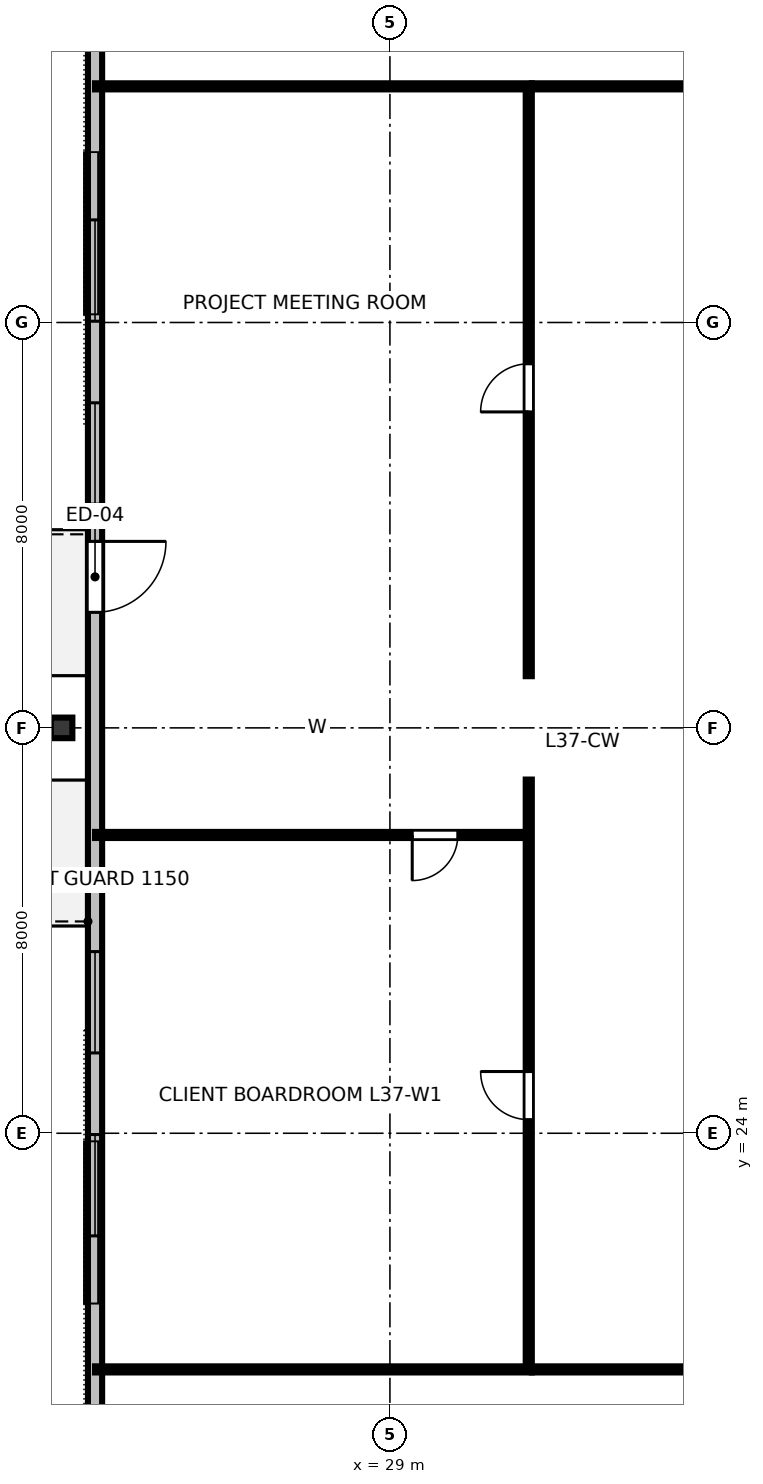
"""IFC4 building model, lengths in metres.
Left out: names, types, materials, properties, quantities, classifications, styles, units other than length and angle.
Written with IfcOpenShell. Run it as: python <this file> out.ifc"""

import sys

from ifc_helpers import new_model, si_unit, direction, frame, frame_2d, origin, origin_2d, place, context, subcontext, project, spatial, rectangle, i_section, extrude, element, fill, save


model = new_model("IFC4")
c1 = context("Model", 3, precision=1e-05, world=origin(), true_north=direction((0.0, 1.0)))
c2 = subcontext(c1, "Body", "Model", "MODEL_VIEW")
j1 = project(units=[si_unit("LENGTHUNIT", "METRE"), si_unit("PLANEANGLEUNIT", "RADIAN")], contexts=[c1])
p1 = place(None, origin())
s1 = spatial("IfcSite", under=j1, at=p1, CompositionType="ELEMENT")
p2 = place(p1, origin())
s2 = spatial("IfcBuilding", under=s1, at=p2, CompositionType="ELEMENT")
p3 = place(p2, frame((0.0, 0.0, 142.0)))
s3 = spatial("IfcBuildingStorey", under=s2, at=p3, CompositionType="ELEMENT", Elevation=142.0)
p4 = place(p3, frame((22.52, 32.0, 0.0), z_axis=(0.0, 0.0, 1.0), x_axis=(0.0, 1.0, 0.0)))
e1 = element("IfcColumn", 1, at=p4, inside=s3, PredefinedType="COLUMN", context=c2, shape_type="SweptSolid", body=[
    extrude(i_section(OverallWidth=0.406, OverallDepth=0.425, WebThickness=0.033, FlangeThickness=0.052, FilletRadius=0.025, at=origin_2d()), origin(), (0.0, 0.0, 1.0), 3.358),
])
p5 = place(p3, frame((23.18, 47.54, 0.0), z_axis=(0.0, 0.0, 1.0), x_axis=(0.0, -1.0, 0.0)))
e2 = element("IfcWall", 2, at=p5, inside=s3, PredefinedType="STANDARD", context=c2, shape_type="SweptSolid", body=[
    extrude(rectangle(XDim=31.08, YDim=0.28, at=frame_2d((15.54, 0.0))), origin(), (0.0, 0.0, 1.0), 3.36),
])
p6 = place(p5, frame((11.86, 0.0, 0.0)))
e3 = element("IfcOpeningElement", 3, at=p6, cuts=e2, PredefinedType="OPENING", context=c2, shape_type="SweptSolid", body=[
    extrude(rectangle(XDim=1.4, YDim=2.15, at=frame_2d((0.7, 1.075))), frame((0.0, 0.15, 0.0), z_axis=(0.0, -1.0, 0.0), x_axis=(1.0, 0.0, 0.0)), (0.0, 0.0, 1.0), 0.3),
])
p7 = place(p5, frame((5.515, 0.0, 0.8)))
e4 = element("IfcOpeningElement", 4, at=p7, cuts=e2, PredefinedType="OPENING", context=c2, shape_type="SweptSolid", body=[
    extrude(rectangle(XDim=2.0, YDim=1.95, at=frame_2d((1.0, 0.975))), frame((0.0, 0.15, 0.0), z_axis=(0.0, -1.0, 0.0), x_axis=(1.0, 0.0, 0.0)), (0.0, 0.0, 1.0), 0.3),
])
p8 = place(p5, frame((9.125, 0.0, 0.8)))
e5 = element("IfcOpeningElement", 5, at=p8, cuts=e2, PredefinedType="OPENING", context=c2, shape_type="SweptSolid", body=[
    extrude(rectangle(XDim=2.0, YDim=1.95, at=frame_2d((1.0, 0.975))), frame((0.0, 0.15, 0.0), z_axis=(0.0, -1.0, 0.0), x_axis=(1.0, 0.0, 0.0)), (0.0, 0.0, 1.0), 0.3),
])
p9 = place(p5, frame((19.955, 0.0, 0.8)))
e6 = element("IfcOpeningElement", 6, at=p9, cuts=e2, PredefinedType="OPENING", context=c2, shape_type="SweptSolid", body=[
    extrude(rectangle(XDim=2.0, YDim=1.95, at=frame_2d((1.0, 0.975))), frame((0.0, 0.15, 0.0), z_axis=(0.0, -1.0, 0.0), x_axis=(1.0, 0.0, 0.0)), (0.0, 0.0, 1.0), 0.3),
])
p10 = place(p5, frame((23.565, 0.0, 0.8)))
e7 = element("IfcOpeningElement", 7, at=p10, cuts=e2, PredefinedType="OPENING", context=c2, shape_type="SweptSolid", body=[
    extrude(rectangle(XDim=2.0, YDim=1.95, at=frame_2d((1.0, 0.975))), frame((0.0, 0.15, 0.0), z_axis=(0.0, -1.0, 0.0), x_axis=(1.0, 0.0, 0.0)), (0.0, 0.0, 1.0), 0.3),
])
p11 = place(p3, frame((31.8, 19.34, 0.0), z_axis=(0.0, 0.0, 1.0), x_axis=(1.0, 0.0, 0.0)))
e8 = element("IfcWall", 8, at=p11, inside=s3, PredefinedType="PARTITIONING", context=c2, shape_type="SweptSolid", body=[
    extrude(rectangle(XDim=28.4, YDim=0.12, at=frame_2d((14.2, 0.0))), origin(), (0.0, 0.0, 1.0), 2.64),
])
p12 = place(p11, frame((3.771, 0.0, 0.0)))
e9 = element("IfcOpeningElement", 9, at=p12, cuts=e8, PredefinedType="OPENING", context=c2, shape_type="SweptSolid", body=[
    extrude(rectangle(XDim=0.95, YDim=2.15, at=frame_2d((0.475, 1.075))), frame((0.0, 0.07, 0.0), z_axis=(0.0, -1.0, 0.0), x_axis=(1.0, 0.0, 0.0)), (0.0, 0.0, 1.0), 0.14),
])
p13 = place(p11, frame((10.068, 0.0, 0.0)))
e10 = element("IfcOpeningElement", 10, at=p13, cuts=e8, PredefinedType="OPENING", context=c2, shape_type="SweptSolid", body=[
    extrude(rectangle(XDim=0.95, YDim=2.15, at=frame_2d((0.475, 1.075))), frame((0.0, 0.07, 0.0), z_axis=(0.0, -1.0, 0.0), x_axis=(1.0, 0.0, 0.0)), (0.0, 0.0, 1.0), 0.14),
])
p14 = place(p11, frame((13.828, 0.0, 0.0)))
e11 = element("IfcOpeningElement", 11, at=p14, cuts=e8, PredefinedType="OPENING", context=c2, shape_type="SweptSolid", body=[
    extrude(rectangle(XDim=0.95, YDim=2.15, at=frame_2d((0.475, 1.075))), frame((0.0, 0.07, 0.0), z_axis=(0.0, -1.0, 0.0), x_axis=(1.0, 0.0, 0.0)), (0.0, 0.0, 1.0), 0.14),
])
p15 = place(p11, frame((18.648, 0.0, 0.0)))
e12 = element("IfcOpeningElement", 12, at=p15, cuts=e8, PredefinedType="OPENING", context=c2, shape_type="SweptSolid", body=[
    extrude(rectangle(XDim=0.95, YDim=2.15, at=frame_2d((0.475, 1.075))), frame((0.0, 0.07, 0.0), z_axis=(0.0, -1.0, 0.0), x_axis=(1.0, 0.0, 0.0)), (0.0, 0.0, 1.0), 0.14),
])
p16 = place(p11, frame((24.842, 0.0, 0.0)))
e13 = element("IfcOpeningElement", 13, at=p16, cuts=e8, PredefinedType="OPENING", context=c2, shape_type="SweptSolid", body=[
    extrude(rectangle(XDim=0.95, YDim=2.15, at=frame_2d((0.475, 1.075))), frame((0.0, 0.07, 0.0), z_axis=(0.0, -1.0, 0.0), x_axis=(1.0, 0.0, 0.0)), (0.0, 0.0, 1.0), 0.14),
])
p17 = place(p3, frame((31.8, 44.66, 0.0), z_axis=(0.0, 0.0, 1.0), x_axis=(1.0, 0.0, 0.0)))
e14 = element("IfcWall", 14, at=p17, inside=s3, PredefinedType="PARTITIONING", context=c2, shape_type="SweptSolid", body=[
    extrude(rectangle(XDim=28.4, YDim=0.12, at=frame_2d((14.2, 0.0))), origin(), (0.0, 0.0, 1.0), 2.64),
])
p18 = place(p17, frame((3.705, 0.0, 0.0)))
e15 = element("IfcOpeningElement", 15, at=p18, cuts=e14, PredefinedType="OPENING", context=c2, shape_type="SweptSolid", body=[
    extrude(rectangle(XDim=0.95, YDim=2.15, at=frame_2d((0.475, 1.075))), frame((0.0, 0.07, 0.0), z_axis=(0.0, -1.0, 0.0), x_axis=(1.0, 0.0, 0.0)), (0.0, 0.0, 1.0), 0.14),
])
p19 = place(p17, frame((11.836, 0.0, 0.0)))
e16 = element("IfcOpeningElement", 16, at=p19, cuts=e14, PredefinedType="OPENING", context=c2, shape_type="SweptSolid", body=[
    extrude(rectangle(XDim=0.95, YDim=2.15, at=frame_2d((0.475, 1.075))), frame((0.0, 0.07, 0.0), z_axis=(0.0, -1.0, 0.0), x_axis=(1.0, 0.0, 0.0)), (0.0, 0.0, 1.0), 0.14),
])
p20 = place(p17, frame((21.856, 0.0, 0.0)))
e17 = element("IfcOpeningElement", 17, at=p20, cuts=e14, PredefinedType="OPENING", context=c2, shape_type="SweptSolid", body=[
    extrude(rectangle(XDim=0.95, YDim=2.15, at=frame_2d((0.475, 1.075))), frame((0.0, 0.07, 0.0), z_axis=(0.0, -1.0, 0.0), x_axis=(1.0, 0.0, 0.0)), (0.0, 0.0, 1.0), 0.14),
])
p21 = place(p3, frame((31.74, 29.887, 0.0), z_axis=(0.0, 0.0, 1.0), x_axis=(-1.0, 0.0, 0.0)))
e18 = element("IfcWall", 18, at=p21, inside=s3, PredefinedType="PARTITIONING", context=c2, shape_type="SweptSolid", body=[
    extrude(rectangle(XDim=8.56, YDim=0.12, at=frame_2d((4.28, 0.0))), origin(), (0.0, 0.0, 1.0), 2.64),
])
p22 = place(p21, frame((1.4, 0.0, 0.0)))
e19 = element("IfcOpeningElement", 19, at=p22, cuts=e18, PredefinedType="OPENING", context=c2, shape_type="SweptSolid", body=[
    extrude(rectangle(XDim=0.9, YDim=2.15, at=frame_2d((0.45, 1.075))), frame((0.0, 0.07, 0.0), z_axis=(0.0, -1.0, 0.0), x_axis=(1.0, 0.0, 0.0)), (0.0, 0.0, 1.0), 0.14),
])
p23 = place(p3, frame((31.74, 19.4, 0.0), z_axis=(0.0, 0.0, 1.0), x_axis=(0.0, 1.0, 0.0)))
e20 = element("IfcWall", 20, at=p23, inside=s3, PredefinedType="PARTITIONING", context=c2, shape_type="SweptSolid", body=[
    extrude(rectangle(XDim=11.58, YDim=0.12, at=frame_2d((5.79, 0.0))), origin(), (0.0, 0.0, 1.0), 2.64),
])
p24 = place(p23, frame((4.868, 0.0, 0.0)))
e21 = element("IfcOpeningElement", 21, at=p24, cuts=e20, PredefinedType="OPENING", context=c2, shape_type="SweptSolid", body=[
    extrude(rectangle(XDim=0.95, YDim=2.15, at=frame_2d((0.475, 1.075))), frame((0.0, 0.07, 0.0), z_axis=(0.0, -1.0, 0.0), x_axis=(1.0, 0.0, 0.0)), (0.0, 0.0, 1.0), 0.14),
])
p25 = place(p3, frame((31.74, 33.02, 0.0), z_axis=(0.0, 0.0, 1.0), x_axis=(0.0, 1.0, 0.0)))
e22 = element("IfcWall", 22, at=p25, inside=s3, PredefinedType="PARTITIONING", context=c2, shape_type="SweptSolid", body=[
    extrude(rectangle(XDim=11.58, YDim=0.12, at=frame_2d((5.79, 0.0))), origin(), (0.0, 0.0, 1.0), 2.64),
])
p26 = place(p25, frame((5.215, 0.0, 0.0)))
e23 = element("IfcOpeningElement", 23, at=p26, cuts=e22, PredefinedType="OPENING", context=c2, shape_type="SweptSolid", body=[
    extrude(rectangle(XDim=0.95, YDim=2.15, at=frame_2d((0.475, 1.075))), frame((0.0, 0.07, 0.0), z_axis=(0.0, -1.0, 0.0), x_axis=(1.0, 0.0, 0.0)), (0.0, 0.0, 1.0), 0.14),
])
for number, where, z_axis, x_axis in (
    (24, (31.8, 19.34, 0.0), (0.0, 0.0, 1.0), (-1.0, 0.0, 0.0)),
    (25, (31.8, 44.66, 0.0), (0.0, 0.0, 1.0), (-1.0, 0.0, 0.0)),
):
    element("IfcWall", number, at=place(p3, frame(where, z_axis=z_axis, x_axis=x_axis)), inside=s3, PredefinedType="PARTITIONING", context=c2, shape_type="SweptSolid", body=[
        extrude(rectangle(XDim=8.62, YDim=0.12, at=frame_2d((4.31, 0.0))), origin(), (0.0, 0.0, 1.0), 2.64),
    ])
p27 = place(p6, origin())
e26 = element("IfcDoor", 26, at=p27, inside=s3, OperationType="SINGLE_SWING_LEFT", PredefinedType="DOOR", context=c2, shape_type="SweptSolid", body=[
    extrude(rectangle(XDim=1.4, YDim=2.15, at=frame_2d((0.7, 1.075))), frame((0.0, 0.025, 0.0), z_axis=(0.0, -1.0, 0.0), x_axis=(1.0, 0.0, 0.0)), (0.0, 0.0, 1.0), 0.05),
])
fill(e3, e26)
p28 = place(p7, origin())
e27 = element("IfcWindow", 27, at=p28, inside=s3, PartitioningType="SINGLE_PANEL", PredefinedType="WINDOW", context=c2, shape_type="SweptSolid", body=[
    extrude(rectangle(XDim=2.0, YDim=1.95, at=frame_2d((1.0, 0.975))), frame((0.0, 0.03, 0.0), z_axis=(0.0, -1.0, 0.0), x_axis=(1.0, 0.0, 0.0)), (0.0, 0.0, 1.0), 0.06),
])
fill(e4, e27)
p29 = place(p8, origin())
e28 = element("IfcWindow", 28, at=p29, inside=s3, PartitioningType="SINGLE_PANEL", PredefinedType="WINDOW", context=c2, shape_type="SweptSolid", body=[
    extrude(rectangle(XDim=2.0, YDim=1.95, at=frame_2d((1.0, 0.975))), frame((0.0, 0.03, 0.0), z_axis=(0.0, -1.0, 0.0), x_axis=(1.0, 0.0, 0.0)), (0.0, 0.0, 1.0), 0.06),
])
fill(e5, e28)
p30 = place(p9, origin())
e29 = element("IfcWindow", 29, at=p30, inside=s3, PartitioningType="SINGLE_PANEL", PredefinedType="WINDOW", context=c2, shape_type="SweptSolid", body=[
    extrude(rectangle(XDim=2.0, YDim=1.95, at=frame_2d((1.0, 0.975))), frame((0.0, 0.03, 0.0), z_axis=(0.0, -1.0, 0.0), x_axis=(1.0, 0.0, 0.0)), (0.0, 0.0, 1.0), 0.06),
])
fill(e6, e29)
p31 = place(p10, origin())
e30 = element("IfcWindow", 30, at=p31, inside=s3, PartitioningType="SINGLE_PANEL", PredefinedType="WINDOW", context=c2, shape_type="SweptSolid", body=[
    extrude(rectangle(XDim=2.0, YDim=1.95, at=frame_2d((1.0, 0.975))), frame((0.0, 0.03, 0.0), z_axis=(0.0, -1.0, 0.0), x_axis=(1.0, 0.0, 0.0)), (0.0, 0.0, 1.0), 0.06),
])
fill(e7, e30)
p32 = place(p22, origin())
e31 = element("IfcDoor", 31, at=p32, inside=s3, OperationType="SINGLE_SWING_RIGHT", PredefinedType="DOOR", context=c2, shape_type="SweptSolid", body=[
    extrude(rectangle(XDim=0.9, YDim=2.15, at=frame_2d((0.45, 1.075))), frame((0.0, 0.025, 0.0), z_axis=(0.0, -1.0, 0.0), x_axis=(1.0, 0.0, 0.0)), (0.0, 0.0, 1.0), 0.05),
])
fill(e19, e31)
p33 = place(p24, origin())
e32 = element("IfcDoor", 32, at=p33, inside=s3, OperationType="SINGLE_SWING_RIGHT", PredefinedType="DOOR", context=c2, shape_type="SweptSolid", body=[
    extrude(rectangle(XDim=0.95, YDim=2.15, at=frame_2d((0.475, 1.075))), frame((0.0, 0.025, 0.0), z_axis=(0.0, -1.0, 0.0), x_axis=(1.0, 0.0, 0.0)), (0.0, 0.0, 1.0), 0.05),
])
fill(e21, e32)
p34 = place(p26, origin())
e33 = element("IfcDoor", 33, at=p34, inside=s3, OperationType="SINGLE_SWING_LEFT", PredefinedType="DOOR", context=c2, shape_type="SweptSolid", body=[
    extrude(rectangle(XDim=0.95, YDim=2.15, at=frame_2d((0.475, 1.075))), frame((0.0, 0.025, 0.0), z_axis=(0.0, -1.0, 0.0), x_axis=(1.0, 0.0, 0.0)), (0.0, 0.0, 1.0), 0.05),
])
fill(e23, e33)
save(model, sys.argv[1])
